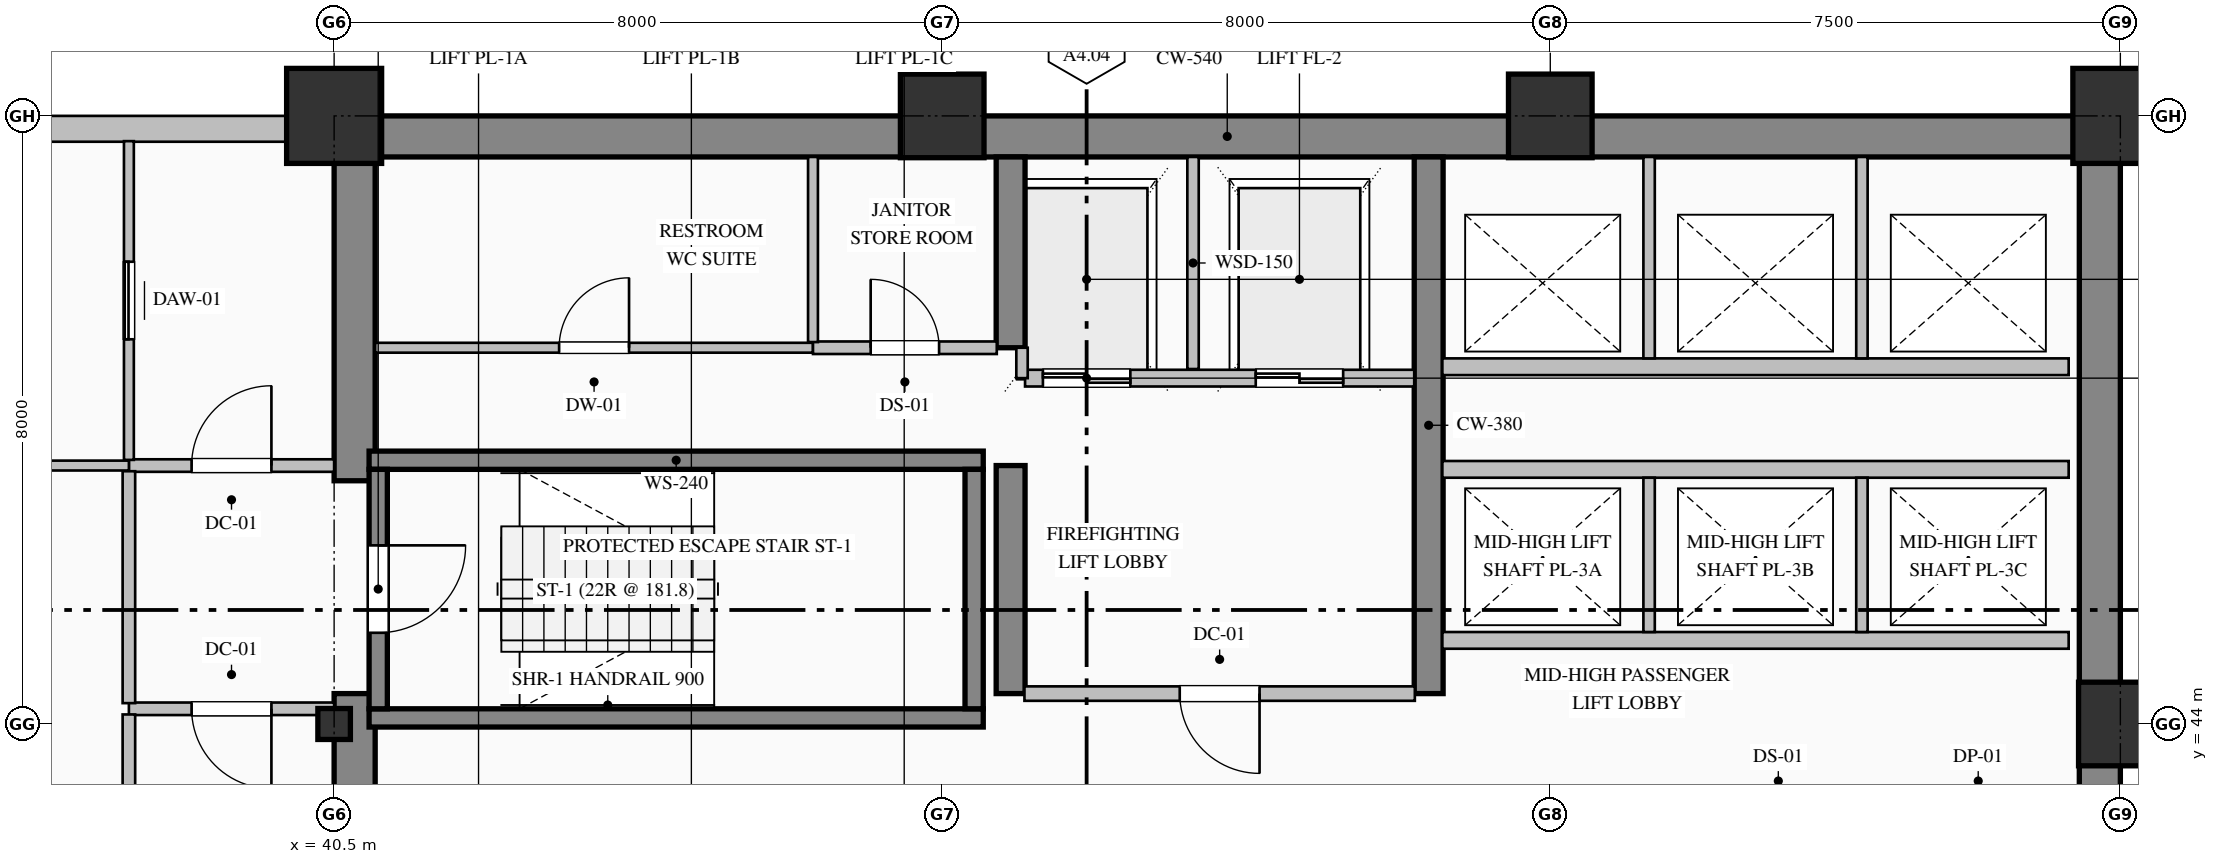
"""IFC4 building model, lengths in metres.
Left out: names, types, materials, properties, quantities, classifications, styles, units other than length and angle.
Written with IfcOpenShell. Run it as: python <this file> out.ifc"""

import sys

from ifc_helpers import new_model, si_unit, direction, frame, frame_2d, origin, origin_2d, place, context, subcontext, project, spatial, rectangle, hollow_rectangle, i_section, extrude, element, fill, save


model = new_model("IFC4")
c1 = context("Model", 3, precision=1e-05, world=origin(), true_north=direction((0.0, 1.0)))
c2 = subcontext(c1, "Body", "Model", "MODEL_VIEW")
j1 = project(units=[si_unit("LENGTHUNIT", "METRE"), si_unit("PLANEANGLEUNIT", "RADIAN")], contexts=[c1])
p1 = place(None, origin())
s1 = spatial("IfcSite", under=j1, at=p1, CompositionType="ELEMENT")
p2 = place(p1, origin())
s2 = spatial("IfcBuilding", under=s1, at=p2, CompositionType="ELEMENT")
p3 = place(p2, frame((0.0, 0.0, 60.2)))
s3 = spatial("IfcBuildingStorey", under=s2, at=p3, CompositionType="ELEMENT", Elevation=60.2)
p4 = place(p3, frame((40.5, 51.73, 0.0), z_axis=(0.0, 0.0, 1.0), x_axis=(1.0, 0.0, 0.0)))
e1 = element("IfcWall", 1, at=p4, inside=s3, PredefinedType="SHEAR", context=c2, shape_type="SweptSolid", body=[
    extrude(rectangle(XDim=23.5, YDim=0.54, at=frame_2d((11.75, 0.0))), origin(), (0.0, 0.0, 1.0), 3.75),
])
p5 = place(p3, frame((63.73, 36.32, 0.0), z_axis=(0.0, 0.0, 1.0), x_axis=(0.0, 1.0, 0.0)))
e2 = element("IfcWall", 2, at=p5, inside=s3, PredefinedType="SHEAR", context=c2, shape_type="SweptSolid", body=[
    extrude(rectangle(XDim=15.14, YDim=0.54, at=frame_2d((7.57, 0.0))), origin(), (0.0, 0.0, 1.0), 3.75),
])
p6 = place(p3, frame((40.77, 36.54, 0.0), z_axis=(0.0, 0.0, 1.0), x_axis=(0.0, 1.0, 0.0)))
e3 = element("IfcWall", 3, at=p6, inside=s3, PredefinedType="SHEAR", context=c2, shape_type="SweptSolid", body=[
    extrude(rectangle(XDim=7.86, YDim=0.54, at=frame_2d((3.93, 0.0))), origin(), (0.0, 0.0, 1.0), 3.75),
])
p7 = place(p3, frame((40.77, 47.2, 0.0), z_axis=(0.0, 0.0, 1.0), x_axis=(0.0, 1.0, 0.0)))
e4 = element("IfcWall", 4, at=p7, inside=s3, PredefinedType="SHEAR", context=c2, shape_type="SweptSolid", body=[
    extrude(rectangle(XDim=4.26, YDim=0.54, at=frame_2d((2.13, 0.0))), origin(), (0.0, 0.0, 1.0), 3.75),
])
p8 = place(p3, frame((49.4, 44.4, 0.0), z_axis=(0.0, 0.0, 1.0), x_axis=(0.0, 1.0, 0.0)))
e5 = element("IfcWall", 5, at=p8, inside=s3, PredefinedType="SHEAR", context=c2, shape_type="SweptSolid", body=[
    extrude(rectangle(XDim=3.0, YDim=0.38, at=frame_2d((1.5, 0.0))), origin(), (0.0, 0.0, 1.0), 3.75),
])
p9 = place(p3, frame((49.4, 48.95, 0.0), z_axis=(0.0, 0.0, 1.0), x_axis=(0.0, 1.0, 0.0)))
e6 = element("IfcWall", 6, at=p9, inside=s3, PredefinedType="SHEAR", context=c2, shape_type="SweptSolid", body=[
    extrude(rectangle(XDim=2.51, YDim=0.38, at=frame_2d((1.255, 0.0))), origin(), (0.0, 0.0, 1.0), 3.75),
])
p10 = place(p3, frame((54.9, 44.4, 0.0), z_axis=(0.0, 0.0, 1.0), x_axis=(0.0, 1.0, 0.0)))
e7 = element("IfcWall", 7, at=p10, inside=s3, PredefinedType="SHEAR", context=c2, shape_type="SweptSolid", body=[
    extrude(rectangle(XDim=7.06, YDim=0.38, at=frame_2d((3.53, 0.0))), origin(), (0.0, 0.0, 1.0), 3.75),
])
p11 = place(p3, frame((40.5, 44.0, 0.0), z_axis=(0.0, 0.0, 1.0), x_axis=(1.0, 0.0, 0.0)))
e8 = element("IfcColumn", 8, at=p11, inside=s3, PredefinedType="COLUMN", context=c2, shape_type="SweptSolid", body=[
    extrude(i_section(OverallWidth=0.407, OverallDepth=0.428, WebThickness=0.02, FlangeThickness=0.035, FilletRadius=0.022, at=origin_2d()), origin(), (0.0, 0.0, 1.0), 4.0),
])
p12 = place(p3, frame((40.5, 52.0, 0.0), z_axis=(0.0, 0.0, 1.0), x_axis=(1.0, 0.0, 0.0)))
e9 = element("IfcColumn", 9, at=p12, inside=s3, PredefinedType="COLUMN", context=c2, shape_type="SweptSolid", body=[
    extrude(hollow_rectangle(XDim=1.25, YDim=1.25, WallThickness=0.045, at=origin_2d()), origin(), (0.0, 0.0, 1.0), 4.0),
])
for number, where, z_axis, x_axis in (
    (10, (48.5, 52.0, 0.0), (0.0, 0.0, 1.0), (1.0, 0.0, 0.0)),
    (11, (56.5, 52.0, 0.0), (0.0, 0.0, 1.0), (1.0, 0.0, 0.0)),
    (12, (64.0, 44.0, 0.0), (0.0, 0.0, 1.0), (1.0, 0.0, 0.0)),
):
    element("IfcColumn", number, at=place(p3, frame(where, z_axis=z_axis, x_axis=x_axis)), inside=s3, PredefinedType="COLUMN", context=c2, shape_type="SweptSolid", body=[
        extrude(hollow_rectangle(XDim=1.1, YDim=1.1, WallThickness=0.04, at=origin_2d()), origin(), (0.0, 0.0, 1.0), 4.0),
    ])
p13 = place(p3, frame((64.0, 52.0, 0.0), z_axis=(0.0, 0.0, 1.0), x_axis=(1.0, 0.0, 0.0)))
e13 = element("IfcColumn", 13, at=p13, inside=s3, PredefinedType="COLUMN", context=c2, shape_type="SweptSolid", body=[
    extrude(hollow_rectangle(XDim=1.25, YDim=1.25, WallThickness=0.045, at=origin_2d()), origin(), (0.0, 0.0, 1.0), 4.0),
])
p14 = place(p3, frame((4.0, 51.83, 0.0), z_axis=(0.0, 0.0, 1.0), x_axis=(1.0, 0.0, 0.0)))
e14 = element("IfcWall", 14, at=p14, inside=s3, PredefinedType="SOLIDWALL", context=c2, shape_type="SweptSolid", body=[
    extrude(rectangle(XDim=36.52, YDim=0.34, at=frame_2d((18.26, 0.0))), origin(), (0.0, 0.0, 1.0), 3.25),
])
p15 = place(p14, frame((6.0, 0.0, 0.8)))
e15 = element("IfcOpeningElement", 15, at=p15, cuts=e14, PredefinedType="OPENING", context=c2, shape_type="SweptSolid", body=[
    extrude(rectangle(XDim=2.4, YDim=2.15, at=frame_2d((1.2, 1.075))), frame((0.0, 0.18, 0.0), z_axis=(0.0, -1.0, 0.0), x_axis=(1.0, 0.0, 0.0)), (0.0, 0.0, 1.0), 0.36),
])
p16 = place(p14, frame((16.8, 0.0, 0.8)))
e16 = element("IfcOpeningElement", 16, at=p16, cuts=e14, PredefinedType="OPENING", context=c2, shape_type="SweptSolid", body=[
    extrude(rectangle(XDim=2.4, YDim=2.15, at=frame_2d((1.2, 1.075))), frame((0.0, 0.18, 0.0), z_axis=(0.0, -1.0, 0.0), x_axis=(1.0, 0.0, 0.0)), (0.0, 0.0, 1.0), 0.36),
])
p17 = place(p14, frame((24.15, 0.0, 0.85)))
e17 = element("IfcOpeningElement", 17, at=p17, cuts=e14, PredefinedType="OPENING", context=c2, shape_type="SweptSolid", body=[
    extrude(rectangle(XDim=2.1, YDim=2.05, at=frame_2d((1.05, 1.025))), frame((0.0, 0.18, 0.0), z_axis=(0.0, -1.0, 0.0), x_axis=(1.0, 0.0, 0.0)), (0.0, 0.0, 1.0), 0.36),
])
for number, where, z_axis, x_axis in (
    (18, (40.96, 47.47, 0.0), (0.0, 0.0, 1.0), (1.0, 0.0, 0.0)),
    (19, (49.04, 44.08, 0.0), (0.0, 0.0, 1.0), (-1.0, 0.0, 0.0)),
):
    element("IfcWall", number, at=place(p3, frame(where, z_axis=z_axis, x_axis=x_axis)), inside=s3, PredefinedType="SOLIDWALL", context=c2, shape_type="SweptSolid", body=[
        extrude(rectangle(XDim=8.08, YDim=0.24, at=frame_2d((4.04, 0.0))), origin(), (0.0, 0.0, 1.0), 4.0),
    ])
p18 = place(p3, frame((41.08, 47.35, 0.0), z_axis=(0.0, 0.0, 1.0), x_axis=(0.0, -1.0, 0.0)))
e20 = element("IfcWall", 20, at=p18, inside=s3, PredefinedType="SOLIDWALL", context=c2, shape_type="SweptSolid", body=[
    extrude(rectangle(XDim=3.15, YDim=0.24, at=frame_2d((1.575, 0.0))), origin(), (0.0, 0.0, 1.0), 4.0),
])
p19 = place(p18, frame((1.0, 0.0, 0.0)))
e21 = element("IfcOpeningElement", 21, at=p19, cuts=e20, PredefinedType="OPENING", context=c2, shape_type="SweptSolid", body=[
    extrude(rectangle(XDim=1.15, YDim=2.2, at=frame_2d((0.575, 1.1))), frame((0.0, 0.13, 0.0), z_axis=(0.0, -1.0, 0.0), x_axis=(1.0, 0.0, 0.0)), (0.0, 0.0, 1.0), 0.26),
])
p20 = place(p3, frame((48.92, 44.2, 0.0), z_axis=(0.0, 0.0, 1.0), x_axis=(0.0, 1.0, 0.0)))
e22 = element("IfcWall", 22, at=p20, inside=s3, PredefinedType="SOLIDWALL", context=c2, shape_type="SweptSolid", body=[
    extrude(rectangle(XDim=3.15, YDim=0.24, at=frame_2d((1.575, 0.0))), origin(), (0.0, 0.0, 1.0), 4.0),
])
p21 = place(p3, frame((54.71, 48.55, 0.0), z_axis=(0.0, 0.0, 1.0), x_axis=(-1.0, 0.0, 0.0)))
e23 = element("IfcWall", 23, at=p21, inside=s3, PredefinedType="PARTITIONING", context=c2, shape_type="SweptSolid", body=[
    extrude(rectangle(XDim=5.12, YDim=0.22, at=frame_2d((2.56, 0.0))), origin(), (0.0, 0.0, 1.0), 3.75),
])
p22 = place(p21, frame((3.735, 0.0, 0.0)))
e24 = element("IfcOpeningElement", 24, at=p22, cuts=e23, PredefinedType="OPENING", context=c2, shape_type="SweptSolid", body=[
    extrude(rectangle(XDim=1.15, YDim=2.2, at=frame_2d((0.575, 1.1))), frame((0.0, 0.12, 0.0), z_axis=(0.0, -1.0, 0.0), x_axis=(1.0, 0.0, 0.0)), (0.0, 0.0, 1.0), 0.24),
])
p23 = place(p21, frame((0.935, 0.0, 0.0)))
e25 = element("IfcOpeningElement", 25, at=p23, cuts=e23, PredefinedType="OPENING", context=c2, shape_type="SweptSolid", body=[
    extrude(rectangle(XDim=1.15, YDim=2.2, at=frame_2d((0.575, 1.1))), frame((0.0, 0.12, 0.0), z_axis=(0.0, -1.0, 0.0), x_axis=(1.0, 0.0, 0.0)), (0.0, 0.0, 1.0), 0.24),
])
p24 = place(p3, frame((51.8, 48.67, 0.0), z_axis=(0.0, 0.0, 1.0), x_axis=(0.0, 1.0, 0.0)))
e26 = element("IfcWall", 26, at=p24, inside=s3, PredefinedType="PARTITIONING", context=c2, shape_type="SweptSolid", body=[
    extrude(rectangle(XDim=2.79, YDim=0.15, at=frame_2d((1.395, 0.0))), origin(), (0.0, 0.0, 1.0), 3.75),
])
p25 = place(p3, frame((49.55, 48.55, 0.0), z_axis=(0.0, 0.0, 1.0), x_axis=(0.0, 1.0, 0.0)))
e27 = element("IfcWall", 27, at=p25, inside=s3, PredefinedType="PARTITIONING", context=c2, shape_type="SweptSolid", body=[
    extrude(rectangle(XDim=0.4, YDim=0.15, at=frame_2d((0.2, 0.0))), origin(), (0.0, 0.0, 1.0), 3.75),
])
for number, where, z_axis, x_axis in (
    (28, (63.32, 45.1, 0.0), (0.0, 0.0, 1.0), (-1.0, 0.0, 0.0)),
    (29, (55.08, 47.35, 0.0), (0.0, 0.0, 1.0), (1.0, 0.0, 0.0)),
):
    element("IfcWall", number, at=place(p3, frame(where, z_axis=z_axis, x_axis=x_axis)), inside=s3, PredefinedType="PARTITIONING", context=c2, shape_type="SweptSolid", body=[
        extrude(rectangle(XDim=8.24, YDim=0.22, at=frame_2d((4.12, 0.0))), origin(), (0.0, 0.0, 1.0), 3.75),
    ])
for number, where, z_axis, x_axis in (
    (30, (57.8, 45.21, 0.0), (0.0, 0.0, 1.0), (0.0, 1.0, 0.0)),
    (31, (60.6, 45.21, 0.0), (0.0, 0.0, 1.0), (0.0, 1.0, 0.0)),
):
    element("IfcWall", number, at=place(p3, frame(where, z_axis=z_axis, x_axis=x_axis)), inside=s3, PredefinedType="PARTITIONING", context=c2, shape_type="SweptSolid", body=[
        extrude(rectangle(XDim=2.03, YDim=0.15, at=frame_2d((1.015, 0.0))), origin(), (0.0, 0.0, 1.0), 3.75),
    ])
p26 = place(p3, frame((63.32, 48.7, 0.0), z_axis=(0.0, 0.0, 1.0), x_axis=(-1.0, 0.0, 0.0)))
e32 = element("IfcWall", 32, at=p26, inside=s3, PredefinedType="PARTITIONING", context=c2, shape_type="SweptSolid", body=[
    extrude(rectangle(XDim=8.24, YDim=0.22, at=frame_2d((4.12, 0.0))), origin(), (0.0, 0.0, 1.0), 3.75),
])
for number, where, z_axis, x_axis in (
    (33, (57.8, 48.81, 0.0), (0.0, 0.0, 1.0), (0.0, 1.0, 0.0)),
    (34, (60.6, 48.81, 0.0), (0.0, 0.0, 1.0), (0.0, 1.0, 0.0)),
):
    element("IfcWall", number, at=place(p3, frame(where, z_axis=z_axis, x_axis=x_axis)), inside=s3, PredefinedType="PARTITIONING", context=c2, shape_type="SweptSolid", body=[
        extrude(rectangle(XDim=2.65, YDim=0.15, at=frame_2d((1.325, 0.0))), origin(), (0.0, 0.0, 1.0), 3.75),
    ])
p27 = place(p3, frame((37.8, 47.4, 0.0), z_axis=(0.0, 0.0, 1.0), x_axis=(1.0, 0.0, 0.0)))
e35 = element("IfcWall", 35, at=p27, inside=s3, PredefinedType="PARTITIONING", context=c2, shape_type="SweptSolid", body=[
    extrude(rectangle(XDim=2.7, YDim=0.165, at=frame_2d((1.35, 0.0))), origin(), (0.0, 0.0, 1.0), 3.75),
])
p28 = place(p27, frame((0.825, 0.0, 0.0)))
e36 = element("IfcOpeningElement", 36, at=p28, cuts=e35, PredefinedType="OPENING", context=c2, shape_type="SweptSolid", body=[
    extrude(rectangle(XDim=1.05, YDim=2.15, at=frame_2d((0.525, 1.075))), frame((0.0, 0.093, 0.0), z_axis=(0.0, -1.0, 0.0), x_axis=(1.0, 0.0, 0.0)), (0.0, 0.0, 1.0), 0.185),
])
p29 = place(p3, frame((40.5, 44.2, 0.0), z_axis=(0.0, 0.0, 1.0), x_axis=(-1.0, 0.0, 0.0)))
e37 = element("IfcWall", 37, at=p29, inside=s3, PredefinedType="PARTITIONING", context=c2, shape_type="SweptSolid", body=[
    extrude(rectangle(XDim=2.7, YDim=0.165, at=frame_2d((1.35, 0.0))), origin(), (0.0, 0.0, 1.0), 3.75),
])
p30 = place(p29, frame((0.825, 0.0, 0.0)))
e38 = element("IfcOpeningElement", 38, at=p30, cuts=e37, PredefinedType="OPENING", context=c2, shape_type="SweptSolid", body=[
    extrude(rectangle(XDim=1.05, YDim=2.15, at=frame_2d((0.525, 1.075))), frame((0.0, 0.093, 0.0), z_axis=(0.0, -1.0, 0.0), x_axis=(1.0, 0.0, 0.0)), (0.0, 0.0, 1.0), 0.185),
])
p31 = place(p3, frame((37.8, 44.274, 0.0), z_axis=(0.0, 0.0, 1.0), x_axis=(0.0, 1.0, 0.0)))
e39 = element("IfcWall", 39, at=p31, inside=s3, PredefinedType="PARTITIONING", context=c2, shape_type="SweptSolid", body=[
    extrude(rectangle(XDim=3.051, YDim=0.165, at=frame_2d((1.525, 0.0))), origin(), (0.0, 0.0, 1.0), 3.75),
])
p32 = place(p3, frame((37.8, 47.475, 0.0), z_axis=(0.0, 0.0, 1.0), x_axis=(0.0, 1.0, 0.0)))
e40 = element("IfcWall", 40, at=p32, inside=s3, PredefinedType="PARTITIONING", context=c2, shape_type="SweptSolid", body=[
    extrude(rectangle(XDim=4.193, YDim=0.13, at=frame_2d((2.097, 0.0))), origin(), (0.0, 0.0, 1.0), 3.75),
])
p33 = place(p32, frame((1.587, 0.0, 0.0)))
e41 = element("IfcOpeningElement", 41, at=p33, cuts=e40, PredefinedType="OPENING", context=c2, shape_type="SweptSolid", body=[
    extrude(rectangle(XDim=1.02, YDim=2.15, at=frame_2d((0.51, 1.075))), frame((0.0, 0.075, 0.0), z_axis=(0.0, -1.0, 0.0), x_axis=(1.0, 0.0, 0.0)), (0.0, 0.0, 1.0), 0.15),
])
p34 = place(p3, frame((37.8, 47.4, 0.0), z_axis=(0.0, 0.0, 1.0), x_axis=(-1.0, 0.0, 0.0)))
e42 = element("IfcWall", 42, at=p34, inside=s3, PredefinedType="PARTITIONING", context=c2, shape_type="SweptSolid", body=[
    extrude(rectangle(XDim=2.4, YDim=0.13, at=frame_2d((1.2, 0.0))), origin(), (0.0, 0.0, 1.0), 3.75),
])
p35 = place(p3, frame((41.04, 48.95, 0.0), z_axis=(0.0, 0.0, 1.0), x_axis=(1.0, 0.0, 0.0)))
e43 = element("IfcWall", 43, at=p35, inside=s3, PredefinedType="PARTITIONING", context=c2, shape_type="SweptSolid", body=[
    extrude(rectangle(XDim=5.76, YDim=0.13, at=frame_2d((2.88, 0.0))), origin(), (0.0, 0.0, 1.0), 3.75),
])
p36 = place(p35, frame((2.42, 0.0, 0.0)))
e44 = element("IfcOpeningElement", 44, at=p36, cuts=e43, PredefinedType="OPENING", context=c2, shape_type="SweptSolid", body=[
    extrude(rectangle(XDim=0.92, YDim=2.15, at=frame_2d((0.46, 1.075))), frame((0.0, 0.075, 0.0), z_axis=(0.0, -1.0, 0.0), x_axis=(1.0, 0.0, 0.0)), (0.0, 0.0, 1.0), 0.15),
])
p37 = place(p3, frame((46.8, 48.95, 0.0), z_axis=(0.0, 0.0, 1.0), x_axis=(1.0, 0.0, 0.0)))
e45 = element("IfcWall", 45, at=p37, inside=s3, PredefinedType="PARTITIONING", context=c2, shape_type="SweptSolid", body=[
    extrude(rectangle(XDim=2.418, YDim=0.165, at=frame_2d((1.209, 0.0))), origin(), (0.0, 0.0, 1.0), 3.75),
])
p38 = place(p37, frame((0.759, 0.0, 0.0)))
e46 = element("IfcOpeningElement", 46, at=p38, cuts=e45, PredefinedType="OPENING", context=c2, shape_type="SweptSolid", body=[
    extrude(rectangle(XDim=0.9, YDim=2.15, at=frame_2d((0.45, 1.075))), frame((0.0, 0.093, 0.0), z_axis=(0.0, -1.0, 0.0), x_axis=(1.0, 0.0, 0.0)), (0.0, 0.0, 1.0), 0.185),
])
p39 = place(p3, frame((54.718, 44.4, 0.0), z_axis=(0.0, 0.0, 1.0), x_axis=(-1.0, 0.0, 0.0)))
e47 = element("IfcWall", 47, at=p39, inside=s3, PredefinedType="PARTITIONING", context=c2, shape_type="SweptSolid", body=[
    extrude(rectangle(XDim=5.136, YDim=0.19, at=frame_2d((2.568, 0.0))), origin(), (0.0, 0.0, 1.0), 3.75),
])
p40 = place(p39, frame((2.043, 0.0, 0.0)))
e48 = element("IfcOpeningElement", 48, at=p40, cuts=e47, PredefinedType="OPENING", context=c2, shape_type="SweptSolid", body=[
    extrude(rectangle(XDim=1.05, YDim=2.15, at=frame_2d((0.525, 1.075))), frame((0.0, 0.105, 0.0), z_axis=(0.0, -1.0, 0.0), x_axis=(1.0, 0.0, 0.0)), (0.0, 0.0, 1.0), 0.21),
])
p41 = place(p3, frame((46.8, 51.46, 0.0), z_axis=(0.0, 0.0, 1.0), x_axis=(0.0, -1.0, 0.0)))
e49 = element("IfcWall", 49, at=p41, inside=s3, PredefinedType="PARTITIONING", context=c2, shape_type="SweptSolid", body=[
    extrude(rectangle(XDim=2.436, YDim=0.13, at=frame_2d((1.218, 0.0))), origin(), (0.0, 0.0, 1.0), 3.75),
])
p42 = place(p3, frame((37.8, 40.475, 0.0), z_axis=(0.0, 0.0, 1.0), x_axis=(0.0, 1.0, 0.0)))
e50 = element("IfcWall", 50, at=p42, inside=s3, PredefinedType="PARTITIONING", context=c2, shape_type="SweptSolid", body=[
    extrude(rectangle(XDim=3.651, YDim=0.165, at=frame_2d((1.825, 0.0))), origin(), (0.0, 0.0, 1.0), 3.75),
])
p43 = place(p19, origin())
e51 = element("IfcDoor", 51, at=p43, inside=s3, OperationType="SINGLE_SWING_LEFT", PredefinedType="DOOR", context=c2, shape_type="SweptSolid", body=[
    extrude(rectangle(XDim=1.15, YDim=2.2, at=frame_2d((0.575, 1.1))), frame((0.0, 0.025, 0.0), z_axis=(0.0, -1.0, 0.0), x_axis=(1.0, 0.0, 0.0)), (0.0, 0.0, 1.0), 0.05),
])
fill(e21, e51)
p44 = place(p22, origin())
e52 = element("IfcDoor", 52, at=p44, inside=s3, OperationType="DOUBLE_DOOR_SLIDING", PredefinedType="DOOR", context=c2, shape_type="SweptSolid", body=[
    extrude(rectangle(XDim=1.15, YDim=2.2, at=frame_2d((0.575, 1.1))), frame((0.0, 0.025, 0.0), z_axis=(0.0, -1.0, 0.0), x_axis=(1.0, 0.0, 0.0)), (0.0, 0.0, 1.0), 0.05),
])
fill(e24, e52)
p45 = place(p23, origin())
e53 = element("IfcDoor", 53, at=p45, inside=s3, OperationType="DOUBLE_DOOR_SLIDING", PredefinedType="DOOR", context=c2, shape_type="SweptSolid", body=[
    extrude(rectangle(XDim=1.15, YDim=2.2, at=frame_2d((0.575, 1.1))), frame((0.0, 0.025, 0.0), z_axis=(0.0, -1.0, 0.0), x_axis=(1.0, 0.0, 0.0)), (0.0, 0.0, 1.0), 0.05),
])
fill(e25, e53)
p46 = place(p40, origin())
e54 = element("IfcDoor", 54, at=p46, inside=s3, OperationType="SINGLE_SWING_LEFT", PredefinedType="DOOR", context=c2, shape_type="SweptSolid", body=[
    extrude(rectangle(XDim=1.05, YDim=2.15, at=frame_2d((0.525, 1.075))), frame((0.0, 0.025, 0.0), z_axis=(0.0, -1.0, 0.0), x_axis=(1.0, 0.0, 0.0)), (0.0, 0.0, 1.0), 0.05),
])
fill(e48, e54)
p47 = place(p28, origin())
e55 = element("IfcDoor", 55, at=p47, inside=s3, OperationType="SINGLE_SWING_RIGHT", PredefinedType="DOOR", context=c2, shape_type="SweptSolid", body=[
    extrude(rectangle(XDim=1.05, YDim=2.15, at=frame_2d((0.525, 1.075))), frame((0.0, 0.025, 0.0), z_axis=(0.0, -1.0, 0.0), x_axis=(1.0, 0.0, 0.0)), (0.0, 0.0, 1.0), 0.05),
])
fill(e36, e55)
p48 = place(p30, origin())
e56 = element("IfcDoor", 56, at=p48, inside=s3, OperationType="SINGLE_SWING_LEFT", PredefinedType="DOOR", context=c2, shape_type="SweptSolid", body=[
    extrude(rectangle(XDim=1.05, YDim=2.15, at=frame_2d((0.525, 1.075))), frame((0.0, 0.025, 0.0), z_axis=(0.0, -1.0, 0.0), x_axis=(1.0, 0.0, 0.0)), (0.0, 0.0, 1.0), 0.05),
])
fill(e38, e56)
p49 = place(p33, origin())
e57 = element("IfcDoor", 57, at=p49, inside=s3, OperationType="SLIDING_TO_LEFT", PredefinedType="DOOR", context=c2, shape_type="SweptSolid", body=[
    extrude(rectangle(XDim=1.02, YDim=2.15, at=frame_2d((0.51, 1.075))), frame((0.0, 0.025, 0.0), z_axis=(0.0, -1.0, 0.0), x_axis=(1.0, 0.0, 0.0)), (0.0, 0.0, 1.0), 0.05),
])
fill(e41, e57)
p50 = place(p36, origin())
e58 = element("IfcDoor", 58, at=p50, inside=s3, OperationType="SINGLE_SWING_RIGHT", PredefinedType="DOOR", context=c2, shape_type="SweptSolid", body=[
    extrude(rectangle(XDim=0.92, YDim=2.15, at=frame_2d((0.46, 1.075))), frame((0.0, 0.025, 0.0), z_axis=(0.0, -1.0, 0.0), x_axis=(1.0, 0.0, 0.0)), (0.0, 0.0, 1.0), 0.05),
])
fill(e44, e58)
p51 = place(p38, origin())
e59 = element("IfcDoor", 59, at=p51, inside=s3, OperationType="SINGLE_SWING_LEFT", PredefinedType="DOOR", context=c2, shape_type="SweptSolid", body=[
    extrude(rectangle(XDim=0.9, YDim=2.15, at=frame_2d((0.45, 1.075))), frame((0.0, 0.025, 0.0), z_axis=(0.0, -1.0, 0.0), x_axis=(1.0, 0.0, 0.0)), (0.0, 0.0, 1.0), 0.05),
])
fill(e46, e59)
save(model, sys.argv[1])
